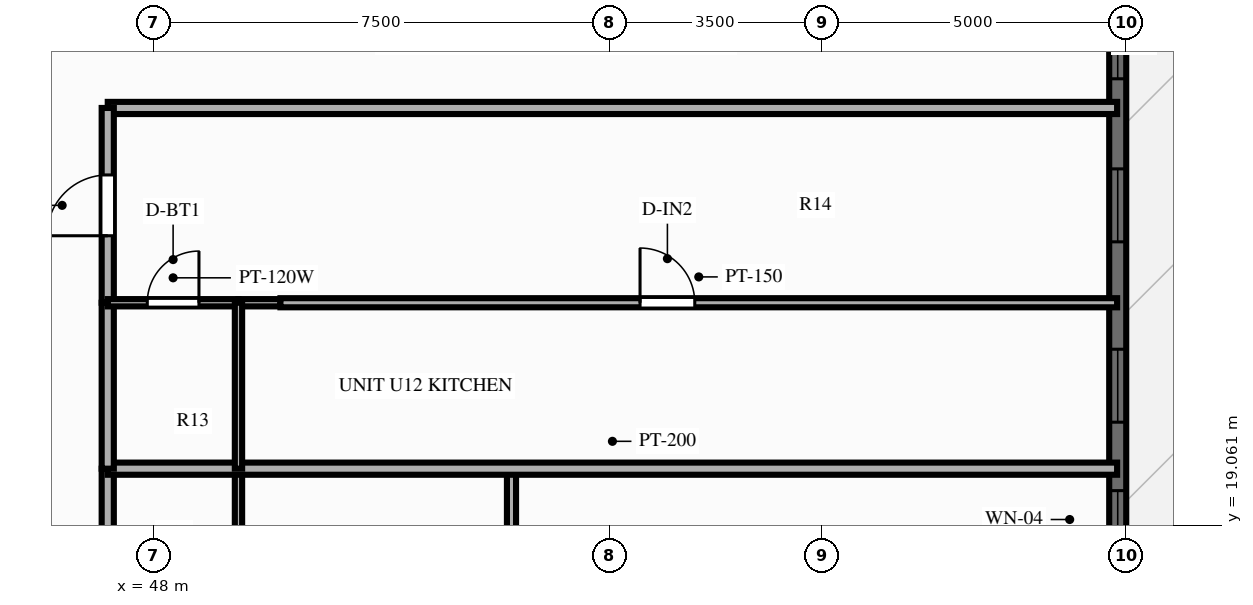
"""IFC4 building model, lengths in metres.
Left out: names, types, materials, properties, quantities, classifications, styles, units other than length and angle.
Written with IfcOpenShell. Run it as: python <this file> out.ifc"""

import sys

from ifc_helpers import new_model, si_unit, direction, frame, frame_2d, origin, place, context, subcontext, project, spatial, rectangle, extrude, source, transform, mapped, element, fill, save


model = new_model("IFC4")
c1 = context("Model", 3, precision=1e-05, world=origin(), true_north=direction((0.0, 1.0)))
c2 = subcontext(c1, "Body", "Model", "MODEL_VIEW")
j1 = project(units=[si_unit("LENGTHUNIT", "METRE"), si_unit("PLANEANGLEUNIT", "RADIAN")], contexts=[c1])
p1 = place(None, origin())
s1 = spatial("IfcSite", under=j1, at=p1, CompositionType="ELEMENT")
p2 = place(p1, origin())
s2 = spatial("IfcBuilding", under=s1, at=p2, CompositionType="ELEMENT")
p3 = place(p2, frame((0.0, 0.0, 116.85)))
s3 = spatial("IfcBuildingStorey", under=s2, at=p3, CompositionType="ELEMENT", Elevation=116.85)
p4 = place(p3, frame((63.86, 7.2, 0.0), z_axis=(0.0, 0.0, 1.0), x_axis=(0.0, 1.0, 0.0)))
e1 = element("IfcWall", 1, at=p4, inside=s3, PredefinedType="SOLIDWALL", context=c2, shape_type="SweptSolid", body=[
    extrude(rectangle(XDim=39.6, YDim=0.28, at=frame_2d((19.8, 0.0))), origin(), (0.0, 0.0, 1.0), 2.28),
])
p5 = place(p4, frame((1.56, 0.0, 0.25)))
e2 = element("IfcOpeningElement", 2, at=p5, cuts=e1, PredefinedType="OPENING", context=c2, shape_type="SweptSolid", body=[
    extrude(rectangle(XDim=1.2, YDim=1.5, at=frame_2d((0.6, 0.75))), frame((0.0, 0.152, 0.0), z_axis=(0.0, -1.0, 0.0), x_axis=(1.0, 0.0, 0.0)), (0.0, 0.0, 1.0), 0.304),
])
p6 = place(p4, frame((4.829, 0.0, 0.25)))
e3 = element("IfcOpeningElement", 3, at=p6, cuts=e1, PredefinedType="OPENING", context=c2, shape_type="SweptSolid", body=[
    extrude(rectangle(XDim=1.2, YDim=1.5, at=frame_2d((0.6, 0.75))), frame((0.0, 0.152, 0.0), z_axis=(0.0, -1.0, 0.0), x_axis=(1.0, 0.0, 0.0)), (0.0, 0.0, 1.0), 0.304),
])
p7 = place(p4, frame((7.567, 0.0, 0.25)))
e4 = element("IfcOpeningElement", 4, at=p7, cuts=e1, PredefinedType="OPENING", context=c2, shape_type="SweptSolid", body=[
    extrude(rectangle(XDim=1.2, YDim=1.5, at=frame_2d((0.6, 0.75))), frame((0.0, 0.152, 0.0), z_axis=(0.0, -1.0, 0.0), x_axis=(1.0, 0.0, 0.0)), (0.0, 0.0, 1.0), 0.304),
])
p8 = place(p4, frame((11.476, 0.0, 0.25)))
e5 = element("IfcOpeningElement", 5, at=p8, cuts=e1, PredefinedType="OPENING", context=c2, shape_type="SweptSolid", body=[
    extrude(rectangle(XDim=0.95, YDim=1.5, at=frame_2d((0.475, 0.75))), frame((0.0, 0.152, 0.0), z_axis=(0.0, -1.0, 0.0), x_axis=(1.0, 0.0, 0.0)), (0.0, 0.0, 1.0), 0.304),
])
p9 = place(p4, frame((13.552, 0.0, 0.25)))
e6 = element("IfcOpeningElement", 6, at=p9, cuts=e1, PredefinedType="OPENING", context=c2, shape_type="SweptSolid", body=[
    extrude(rectangle(XDim=1.2, YDim=1.5, at=frame_2d((0.6, 0.75))), frame((0.0, 0.152, 0.0), z_axis=(0.0, -1.0, 0.0), x_axis=(1.0, 0.0, 0.0)), (0.0, 0.0, 1.0), 0.304),
])
p10 = place(p4, frame((16.518, 0.0, 0.25)))
e7 = element("IfcOpeningElement", 7, at=p10, cuts=e1, PredefinedType="OPENING", context=c2, shape_type="SweptSolid", body=[
    extrude(rectangle(XDim=1.2, YDim=1.5, at=frame_2d((0.6, 0.75))), frame((0.0, 0.152, 0.0), z_axis=(0.0, -1.0, 0.0), x_axis=(1.0, 0.0, 0.0)), (0.0, 0.0, 1.0), 0.304),
])
p11 = place(p4, frame((19.2, 0.0, 0.25)))
e8 = element("IfcOpeningElement", 8, at=p11, cuts=e1, PredefinedType="OPENING", context=c2, shape_type="SweptSolid", body=[
    extrude(rectangle(XDim=1.2, YDim=1.5, at=frame_2d((0.6, 0.75))), frame((0.0, 0.152, 0.0), z_axis=(0.0, -1.0, 0.0), x_axis=(1.0, 0.0, 0.0)), (0.0, 0.0, 1.0), 0.304),
])
p12 = place(p4, frame((21.578, 0.0, 0.25)))
e9 = element("IfcOpeningElement", 9, at=p12, cuts=e1, PredefinedType="OPENING", context=c2, shape_type="SweptSolid", body=[
    extrude(rectangle(XDim=1.2, YDim=1.5, at=frame_2d((0.6, 0.75))), frame((0.0, 0.152, 0.0), z_axis=(0.0, -1.0, 0.0), x_axis=(1.0, 0.0, 0.0)), (0.0, 0.0, 1.0), 0.304),
])
p13 = place(p4, frame((26.313, 0.0, 0.0), z_axis=(0.0, 0.0, 1.0), x_axis=(-1.0, 0.0, 0.0)))
e10 = element("IfcOpeningElement", 10, at=p13, cuts=e1, PredefinedType="OPENING", context=c2, shape_type="SweptSolid", body=[
    extrude(rectangle(XDim=1.6, YDim=2.15, at=frame_2d((0.8, 1.075))), frame((0.0, 0.152, 0.0), z_axis=(0.0, -1.0, 0.0), x_axis=(1.0, 0.0, 0.0)), (0.0, 0.0, 1.0), 0.304),
])
p14 = place(p4, frame((29.305, 0.0, 0.25)))
e11 = element("IfcOpeningElement", 11, at=p14, cuts=e1, PredefinedType="OPENING", context=c2, shape_type="SweptSolid", body=[
    extrude(rectangle(XDim=0.7, YDim=1.5, at=frame_2d((0.35, 0.75))), frame((0.0, 0.152, 0.0), z_axis=(0.0, -1.0, 0.0), x_axis=(1.0, 0.0, 0.0)), (0.0, 0.0, 1.0), 0.304),
])
p15 = place(p4, frame((30.848, 0.0, 0.25)))
e12 = element("IfcOpeningElement", 12, at=p15, cuts=e1, PredefinedType="OPENING", context=c2, shape_type="SweptSolid", body=[
    extrude(rectangle(XDim=1.2, YDim=1.5, at=frame_2d((0.6, 0.75))), frame((0.0, 0.152, 0.0), z_axis=(0.0, -1.0, 0.0), x_axis=(1.0, 0.0, 0.0)), (0.0, 0.0, 1.0), 0.304),
])
p16 = place(p4, frame((34.183, 0.0, 0.25)))
e13 = element("IfcOpeningElement", 13, at=p16, cuts=e1, PredefinedType="OPENING", context=c2, shape_type="SweptSolid", body=[
    extrude(rectangle(XDim=1.2, YDim=1.5, at=frame_2d((0.6, 0.75))), frame((0.0, 0.152, 0.0), z_axis=(0.0, -1.0, 0.0), x_axis=(1.0, 0.0, 0.0)), (0.0, 0.0, 1.0), 0.304),
])
p17 = place(p4, frame((37.452, 0.0, 0.25)))
e14 = element("IfcOpeningElement", 14, at=p17, cuts=e1, PredefinedType="OPENING", context=c2, shape_type="SweptSolid", body=[
    extrude(rectangle(XDim=1.2, YDim=1.5, at=frame_2d((0.6, 0.75))), frame((0.0, 0.152, 0.0), z_axis=(0.0, -1.0, 0.0), x_axis=(1.0, 0.0, 0.0)), (0.0, 0.0, 1.0), 0.304),
])
p18 = place(p3, frame((47.25, 25.92, 0.0), z_axis=(0.0, 0.0, 1.0), x_axis=(1.0, 0.0, 0.0)))
e15 = element("IfcWall", 15, at=p18, inside=s3, PredefinedType="PARTITIONING", context=c2, shape_type="SweptSolid", body=[
    extrude(rectangle(XDim=16.6, YDim=0.2, at=frame_2d((8.3, 0.0))), origin(), (0.0, 0.0, 1.0), 2.79),
])
p19 = place(p3, frame((47.25, 16.68, 0.0), z_axis=(0.0, 0.0, 1.0), x_axis=(0.0, 1.0, 0.0)))
e16 = element("IfcWall", 16, at=p19, inside=s3, PredefinedType="PARTITIONING", context=c2, shape_type="SweptSolid", body=[
    extrude(rectangle(XDim=3.307, YDim=0.2, at=frame_2d((1.654, 0.0))), origin(), (0.0, 0.0, 1.0), 2.79),
])
p20 = place(p3, frame((49.4, 16.68, 0.0), z_axis=(0.0, 0.0, 1.0), x_axis=(0.0, 1.0, 0.0)))
e17 = element("IfcWall", 17, at=p20, inside=s3, PredefinedType="PARTITIONING", context=c2, shape_type="SweptSolid", body=[
    extrude(rectangle(XDim=3.307, YDim=0.12, at=frame_2d((1.654, 0.0))), origin(), (0.0, 0.0, 1.0), 2.79),
])
p21 = place(p3, frame((53.89, 16.68, 0.0), z_axis=(0.0, 0.0, 1.0), x_axis=(0.0, 1.0, 0.0)))
e18 = element("IfcWall", 18, at=p21, inside=s3, PredefinedType="PARTITIONING", context=c2, shape_type="SweptSolid", body=[
    extrude(rectangle(XDim=3.307, YDim=0.15, at=frame_2d((1.654, 0.0))), origin(), (0.0, 0.0, 1.0), 2.79),
])
p22 = place(p3, frame((47.25, 19.987, 0.0), z_axis=(0.0, 0.0, 1.0), x_axis=(1.0, 0.0, 0.0)))
e19 = element("IfcWall", 19, at=p22, inside=s3, PredefinedType="PARTITIONING", context=c2, shape_type="SweptSolid", body=[
    extrude(rectangle(XDim=16.6, YDim=0.2, at=frame_2d((8.3, 0.0))), origin(), (0.0, 0.0, 1.0), 2.79),
])
p23 = place(p3, frame((47.25, 19.987, 0.0), z_axis=(0.0, 0.0, 1.0), x_axis=(0.0, 1.0, 0.0)))
e20 = element("IfcWall", 20, at=p23, inside=s3, PredefinedType="PARTITIONING", context=c2, shape_type="SweptSolid", body=[
    extrude(rectangle(XDim=2.729, YDim=0.2, at=frame_2d((1.365, 0.0))), origin(), (0.0, 0.0, 1.0), 2.79),
])
p24 = place(p3, frame((47.25, 22.716, 0.0), z_axis=(0.0, 0.0, 1.0), x_axis=(0.0, 1.0, 0.0)))
e21 = element("IfcWall", 21, at=p24, inside=s3, PredefinedType="PARTITIONING", context=c2, shape_type="SweptSolid", body=[
    extrude(rectangle(XDim=3.204, YDim=0.2, at=frame_2d((1.602, 0.0))), origin(), (0.0, 0.0, 1.0), 2.79),
])
p25 = place(p24, frame((1.102, 0.0, 0.0)))
e22 = element("IfcOpeningElement", 22, at=p25, cuts=e21, PredefinedType="OPENING", context=c2, shape_type="SweptSolid", body=[
    extrude(rectangle(XDim=1.0, YDim=2.15, at=frame_2d((0.5, 1.075))), frame((0.0, 0.112, 0.0), z_axis=(0.0, -1.0, 0.0), x_axis=(1.0, 0.0, 0.0)), (0.0, 0.0, 1.0), 0.224),
])
p26 = place(p3, frame((47.25, 22.716, 0.0), z_axis=(0.0, 0.0, 1.0), x_axis=(1.0, 0.0, 0.0)))
e23 = element("IfcWall", 23, at=p26, inside=s3, PredefinedType="PARTITIONING", context=c2, shape_type="SweptSolid", body=[
    extrude(rectangle(XDim=2.15, YDim=0.12, at=frame_2d((1.075, 0.0))), origin(), (0.0, 0.0, 1.0), 2.79),
])
p27 = place(p26, frame((0.65, 0.0, 0.0)))
e24 = element("IfcOpeningElement", 24, at=p27, cuts=e23, PredefinedType="OPENING", context=c2, shape_type="SweptSolid", body=[
    extrude(rectangle(XDim=0.85, YDim=2.05, at=frame_2d((0.425, 1.025))), frame((0.0, 0.072, 0.0), z_axis=(0.0, -1.0, 0.0), x_axis=(1.0, 0.0, 0.0)), (0.0, 0.0, 1.0), 0.144),
])
p28 = place(p3, frame((49.4, 22.716, 0.0), z_axis=(0.0, 0.0, 1.0), x_axis=(1.0, 0.0, 0.0)))
e25 = element("IfcWall", 25, at=p28, inside=s3, PredefinedType="PARTITIONING", context=c2, shape_type="SweptSolid", body=[
    extrude(rectangle(XDim=0.69, YDim=0.12, at=frame_2d((0.345, 0.0))), origin(), (0.0, 0.0, 1.0), 2.79),
])
p29 = place(p3, frame((49.4, 19.987, 0.0), z_axis=(0.0, 0.0, 1.0), x_axis=(0.0, 1.0, 0.0)))
e26 = element("IfcWall", 26, at=p29, inside=s3, PredefinedType="PARTITIONING", context=c2, shape_type="SweptSolid", body=[
    extrude(rectangle(XDim=2.729, YDim=0.12, at=frame_2d((1.365, 0.0))), origin(), (0.0, 0.0, 1.0), 2.79),
])
p30 = place(p3, frame((50.09, 22.716, 0.0), z_axis=(0.0, 0.0, 1.0), x_axis=(1.0, 0.0, 0.0)))
e27 = element("IfcWall", 27, at=p30, inside=s3, PredefinedType="PARTITIONING", context=c2, shape_type="SweptSolid", body=[
    extrude(rectangle(XDim=13.76, YDim=0.15, at=frame_2d((6.88, 0.0))), origin(), (0.0, 0.0, 1.0), 2.79),
])
p31 = place(p30, frame((5.914, 0.0, 0.0)))
e28 = element("IfcOpeningElement", 28, at=p31, cuts=e27, PredefinedType="OPENING", context=c2, shape_type="SweptSolid", body=[
    extrude(rectangle(XDim=0.9, YDim=2.1, at=frame_2d((0.45, 1.05))), frame((0.0, 0.087, 0.0), z_axis=(0.0, -1.0, 0.0), x_axis=(1.0, 0.0, 0.0)), (0.0, 0.0, 1.0), 0.174),
])
m1 = source(origin(), c2, "Body", "SweptSolid", [
    extrude(rectangle(XDim=0.95, YDim=1.5, at=frame_2d((0.475, 0.75))), frame((0.0, 0.03, 0.0), z_axis=(0.0, -1.0, 0.0), x_axis=(1.0, 0.0, 0.0)), (0.0, 0.0, 1.0), 0.06),
])
p32 = place(p8, origin())
e29 = element("IfcWindow", 29, at=p32, inside=s3, PartitioningType="SINGLE_PANEL", PredefinedType="WINDOW", context=c2, shape_type="MappedRepresentation", body=[
    mapped(m1, transform((0.0, 0.0, 0.0), scale=1.0)),
])
fill(e5, e29)
m2 = source(origin(), c2, "Body", "SweptSolid", [
    extrude(rectangle(XDim=1.2, YDim=1.5, at=frame_2d((0.6, 0.75))), frame((0.0, 0.03, 0.0), z_axis=(0.0, -1.0, 0.0), x_axis=(1.0, 0.0, 0.0)), (0.0, 0.0, 1.0), 0.06),
])
p33 = place(p9, origin())
e30 = element("IfcWindow", 30, at=p33, inside=s3, PartitioningType="SINGLE_PANEL", PredefinedType="WINDOW", context=c2, shape_type="MappedRepresentation", body=[
    mapped(m2, transform((0.0, 0.0, 0.0), scale=1.0)),
])
fill(e6, e30)
p34 = place(p10, origin())
e31 = element("IfcWindow", 31, at=p34, inside=s3, PartitioningType="SINGLE_PANEL", PredefinedType="WINDOW", context=c2, shape_type="MappedRepresentation", body=[
    mapped(m2, transform((0.0, 0.0, 0.0), scale=1.0)),
])
fill(e7, e31)
p35 = place(p11, origin())
e32 = element("IfcWindow", 32, at=p35, inside=s3, PartitioningType="SINGLE_PANEL", PredefinedType="WINDOW", context=c2, shape_type="MappedRepresentation", body=[
    mapped(m2, transform((0.0, 0.0, 0.0), scale=1.0)),
])
fill(e8, e32)
m3 = source(origin(), c2, "Body", "SweptSolid", [
    extrude(rectangle(XDim=1.0, YDim=2.15, at=frame_2d((0.5, 1.075))), frame((0.0, 0.025, 0.0), z_axis=(0.0, -1.0, 0.0), x_axis=(1.0, 0.0, 0.0)), (0.0, 0.0, 1.0), 0.05),
])
p36 = place(p25, origin())
e33 = element("IfcDoor", 33, at=p36, inside=s3, OperationType="SINGLE_SWING_LEFT", PredefinedType="DOOR", context=c2, shape_type="MappedRepresentation", body=[
    mapped(m3, transform((0.0, 0.0, 0.0), scale=1.0)),
])
fill(e22, e33)
m4 = source(origin(), c2, "Body", "SweptSolid", [
    extrude(rectangle(XDim=0.85, YDim=2.05, at=frame_2d((0.425, 1.025))), frame((0.0, 0.025, 0.0), z_axis=(0.0, -1.0, 0.0), x_axis=(1.0, 0.0, 0.0)), (0.0, 0.0, 1.0), 0.05),
])
p37 = place(p27, origin())
e34 = element("IfcDoor", 34, at=p37, inside=s3, OperationType="SINGLE_SWING_RIGHT", PredefinedType="DOOR", context=c2, shape_type="MappedRepresentation", body=[
    mapped(m4, transform((0.0, 0.0, 0.0), scale=1.0)),
])
fill(e24, e34)
m5 = source(origin(), c2, "Body", "SweptSolid", [
    extrude(rectangle(XDim=0.9, YDim=2.1, at=frame_2d((0.45, 1.05))), frame((0.0, 0.025, 0.0), z_axis=(0.0, -1.0, 0.0), x_axis=(1.0, 0.0, 0.0)), (0.0, 0.0, 1.0), 0.05),
])
p38 = place(p31, origin())
e35 = element("IfcDoor", 35, at=p38, inside=s3, OperationType="SINGLE_SWING_LEFT", PredefinedType="DOOR", context=c2, shape_type="MappedRepresentation", body=[
    mapped(m5, transform((0.0, 0.0, 0.0), scale=1.0)),
])
fill(e28, e35)
save(model, sys.argv[1])
